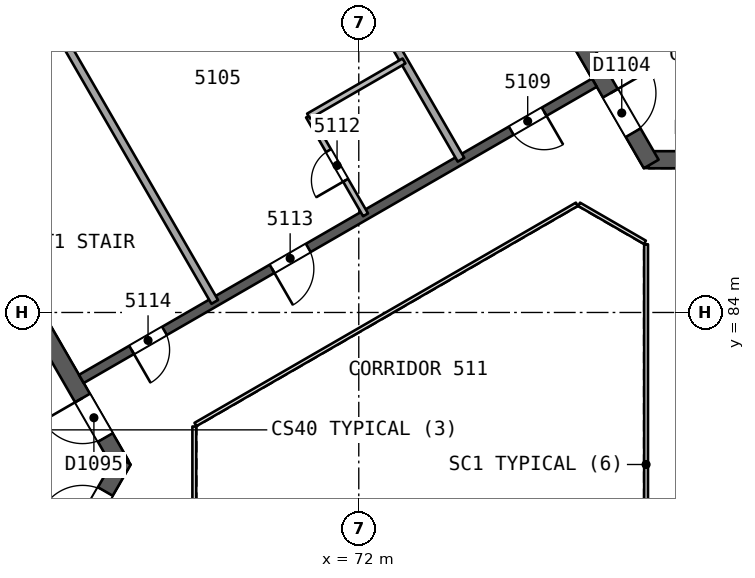
"""IFC4 building model, lengths in metres.
Left out: names, types, materials, properties, quantities, classifications, styles, units other than length and angle.
Written with IfcOpenShell. Run it as: python <this file> out.ifc"""

import sys

from ifc_helpers import new_model, si_unit, direction, frame, frame_2d, origin, place, context, subcontext, project, spatial, rectangle, extrude, element, fill, save


model = new_model("IFC4")
c1 = context("Model", 3, precision=1e-05, world=origin(), true_north=direction((0.0, 1.0)))
c2 = subcontext(c1, "Body", "Model", "MODEL_VIEW")
j1 = project(units=[si_unit("LENGTHUNIT", "METRE"), si_unit("PLANEANGLEUNIT", "RADIAN")], contexts=[c1])
p1 = place(None, origin())
s1 = spatial("IfcSite", under=j1, at=p1, CompositionType="ELEMENT")
p2 = place(p1, origin())
s2 = spatial("IfcBuilding", under=s1, at=p2, CompositionType="ELEMENT")
p3 = place(p2, frame((0.0, 0.0, 209.5)))
s3 = spatial("IfcBuildingStorey", under=s2, at=p3, CompositionType="ELEMENT", Elevation=209.5)
p4 = place(p3, frame((65.74, 80.0, 0.0), z_axis=(0.0, 0.0, 1.0), x_axis=(-0.499991857942, 0.866030104553, 0.0)))
e1 = element("IfcWall", 1, at=p4, inside=s3, PredefinedType="SHEAR", context=c2, shape_type="SweptSolid", body=[
    extrude(rectangle(XDim=10.25, YDim=0.45, at=frame_2d((5.125, 0.0))), origin(), (0.0, 0.0, 1.0), 3.7),
])
p5 = place(p4, frame((0.82, 0.0, 0.0)))
e2 = element("IfcOpeningElement", 2, at=p5, cuts=e1, PredefinedType="OPENING", context=c2, shape_type="SweptSolid", body=[
    extrude(rectangle(XDim=1.2, YDim=2.1, at=frame_2d((0.6, 1.05))), frame((0.0, 0.235, 0.0), z_axis=(0.0, -1.0, 0.0), x_axis=(1.0, 0.0, 0.0)), (0.0, 0.0, 1.0), 0.471),
])
p6 = place(p3, frame((60.728, 71.318, 0.0), z_axis=(0.0, 0.0, 1.0), x_axis=(0.500012416173, 0.866018235185, 0.0)))
e3 = element("IfcWall", 3, at=p6, inside=s3, PredefinedType="SHEAR", context=c2, shape_type="SweptSolid", body=[
    extrude(rectangle(XDim=10.155, YDim=0.45, at=frame_2d((5.078, 0.0))), origin(), (0.0, 0.0, 1.0), 3.7),
])
p7 = place(p6, frame((8.005, 0.0, 0.0)))
e4 = element("IfcOpeningElement", 4, at=p7, cuts=e3, PredefinedType="OPENING", context=c2, shape_type="SweptSolid", body=[
    extrude(rectangle(XDim=1.2, YDim=2.1, at=frame_2d((0.6, 1.05))), frame((0.0, 0.235, 0.0), z_axis=(0.0, -1.0, 0.0), x_axis=(1.0, 0.0, 0.0)), (0.0, 0.0, 1.0), 0.471),
])
p8 = place(p3, frame((79.63, 88.019, 0.0), z_axis=(0.0, 0.0, 1.0), x_axis=(1.0, 0.0, 0.0)))
e5 = element("IfcWall", 5, at=p8, inside=s3, PredefinedType="SHEAR", context=c2, shape_type="SweptSolid", body=[
    extrude(rectangle(XDim=10.25, YDim=0.45, at=frame_2d((5.125, 0.0))), origin(), (0.0, 0.0, 1.0), 3.7),
])
p9 = place(p8, frame((0.82, 0.0, 0.0)))
e6 = element("IfcOpeningElement", 6, at=p9, cuts=e5, PredefinedType="OPENING", context=c2, shape_type="SweptSolid", body=[
    extrude(rectangle(XDim=1.2, YDim=2.1, at=frame_2d((0.6, 1.05))), frame((0.0, 0.235, 0.0), z_axis=(0.0, -1.0, 0.0), x_axis=(1.0, 0.0, 0.0)), (0.0, 0.0, 1.0), 0.471),
])
p10 = place(p3, frame((74.617, 96.701, 0.0), z_axis=(0.0, 0.0, 1.0), x_axis=(0.499994385119, -0.866028645513, 0.0)))
e7 = element("IfcWall", 7, at=p10, inside=s3, PredefinedType="SHEAR", context=c2, shape_type="SweptSolid", body=[
    extrude(rectangle(XDim=10.155, YDim=0.45, at=frame_2d((5.077, 0.0))), origin(), (0.0, 0.0, 1.0), 3.7),
])
p11 = place(p10, frame((8.005, 0.0, 0.0)))
e8 = element("IfcOpeningElement", 8, at=p11, cuts=e7, PredefinedType="OPENING", context=c2, shape_type="SweptSolid", body=[
    extrude(rectangle(XDim=1.2, YDim=2.1, at=frame_2d((0.6, 1.05))), frame((0.0, 0.235, 0.0), z_axis=(0.0, -1.0, 0.0), x_axis=(1.0, 0.0, 0.0)), (0.0, 0.0, 1.0), 0.471),
])
p12 = place(p3, frame((78.2, 90.046, 0.0), z_axis=(0.0, 0.0, 1.0), x_axis=(-0.866026492143, -0.499998114903, 0.0)))
e9 = element("IfcWall", 9, at=p12, inside=s3, PredefinedType="SHEAR", context=c2, shape_type="SweptSolid", body=[
    extrude(rectangle(XDim=15.588, YDim=0.25, at=frame_2d((7.794, 0.0))), origin(), (0.0, 0.0, 1.0), 3.3),
])
p13 = place(p12, frame((1.527, 0.0, 0.0)))
e10 = element("IfcOpeningElement", 10, at=p13, cuts=e9, PredefinedType="OPENING", context=c2, shape_type="SweptSolid", body=[
    extrude(rectangle(XDim=1.0, YDim=2.1, at=frame_2d((0.5, 1.05))), frame((0.0, 0.135, 0.0), z_axis=(0.0, -1.0, 0.0), x_axis=(1.0, 0.0, 0.0)), (0.0, 0.0, 1.0), 0.271),
])
p14 = place(p12, frame((8.694, 0.0, 0.0)))
e11 = element("IfcOpeningElement", 11, at=p14, cuts=e9, PredefinedType="OPENING", context=c2, shape_type="SweptSolid", body=[
    extrude(rectangle(XDim=1.1, YDim=2.1, at=frame_2d((0.55, 1.05))), frame((0.0, 0.135, 0.0), z_axis=(0.0, -1.0, 0.0), x_axis=(1.0, 0.0, 0.0)), (0.0, 0.0, 1.0), 0.271),
])
p15 = place(p12, frame((13.062, 0.0, 0.0)))
e12 = element("IfcOpeningElement", 12, at=p15, cuts=e9, PredefinedType="OPENING", context=c2, shape_type="SweptSolid", body=[
    extrude(rectangle(XDim=1.0, YDim=2.1, at=frame_2d((0.5, 1.05))), frame((0.0, 0.135, 0.0), z_axis=(0.0, -1.0, 0.0), x_axis=(1.0, 0.0, 0.0)), (0.0, 0.0, 1.0), 0.271),
])
p16 = place(p3, frame((69.376, 97.223, 0.0), z_axis=(0.0, 0.0, 1.0), x_axis=(0.499993571489, -0.866029115255, 0.0)))
e13 = element("IfcWall", 13, at=p16, inside=s3, PredefinedType="PARTITIONING", context=c2, shape_type="SweptSolid", body=[
    extrude(rectangle(XDim=10.627, YDim=0.2, at=frame_2d((5.313, 0.0))), origin(), (0.0, 0.0, 1.0), 3.3),
])
p17 = place(p3, frame((72.178, 86.569, 0.0), z_axis=(0.0, 0.0, 1.0), x_axis=(-0.499990139034, 0.866031096941, 0.0)))
e14 = element("IfcWall", 14, at=p17, inside=s3, PredefinedType="PARTITIONING", context=c2, shape_type="SweptSolid", body=[
    extrude(rectangle(XDim=3.0, YDim=0.15, at=frame_2d((1.5, 0.0))), origin(), (0.0, 0.0, 1.0), 3.3),
])
p18 = place(p17, frame((1.05, 0.0, 0.0)))
e15 = element("IfcOpeningElement", 15, at=p18, cuts=e14, PredefinedType="OPENING", context=c2, shape_type="SweptSolid", body=[
    extrude(rectangle(XDim=0.9, YDim=2.1, at=frame_2d((0.45, 1.05))), frame((0.0, 0.085, 0.0), z_axis=(0.0, -1.0, 0.0), x_axis=(1.0, 0.0, 0.0)), (0.0, 0.0, 1.0), 0.171),
])
p19 = place(p3, frame((70.678, 89.167, 0.0), z_axis=(0.0, 0.0, 1.0), x_axis=(0.866032775405, 0.499987231761, 0.0)))
e16 = element("IfcWall", 16, at=p19, inside=s3, PredefinedType="PARTITIONING", context=c2, shape_type="SweptSolid", body=[
    extrude(rectangle(XDim=2.9, YDim=0.15, at=frame_2d((1.45, 0.0))), origin(), (0.0, 0.0, 1.0), 3.3),
])
p20 = place(p3, frame((62.896, 93.481, 0.0), z_axis=(0.0, 0.0, 1.0), x_axis=(0.499993571489, -0.866029115255, 0.0)))
e17 = element("IfcWall", 17, at=p20, inside=s3, PredefinedType="PARTITIONING", context=c2, shape_type="SweptSolid", body=[
    extrude(rectangle(XDim=10.627, YDim=0.2, at=frame_2d((5.313, 0.0))), origin(), (0.0, 0.0, 1.0), 3.3),
])
p21 = place(p3, frame((43.802, 82.63, 0.0), z_axis=(0.0, 0.0, 1.0), x_axis=(0.866026224187, 0.499998579018, 0.0)))
e18 = element("IfcWall", 18, at=p21, inside=s3, PredefinedType="SOLIDWALL", context=c2, shape_type="SweptSolid", body=[
    extrude(rectangle(XDim=51.406, YDim=0.3, at=frame_2d((25.703, 0.0))), origin(), (0.0, 0.0, 1.0), 3.3),
])
p22 = place(p21, frame((24.503, 0.0, 0.0)))
e19 = element("IfcOpeningElement", 19, at=p22, cuts=e18, PredefinedType="OPENING", context=c2, shape_type="SweptSolid", body=[
    extrude(rectangle(XDim=2.4, YDim=2.4, at=frame_2d((1.2, 1.2))), frame((0.0, 0.161, 0.0), z_axis=(0.0, -1.0, 0.0), x_axis=(1.0, 0.0, 0.0)), (0.0, 0.0, 1.0), 0.321),
])
p23 = place(p21, frame((30.271, 0.0, 0.0)))
e20 = element("IfcOpeningElement", 20, at=p23, cuts=e18, PredefinedType="OPENING", context=c2, shape_type="SweptSolid", body=[
    extrude(rectangle(XDim=2.4, YDim=2.4, at=frame_2d((1.2, 1.2))), frame((0.0, 0.161, 0.0), z_axis=(0.0, -1.0, 0.0), x_axis=(1.0, 0.0, 0.0)), (0.0, 0.0, 1.0), 0.321),
])
p24 = place(p21, frame((39.983, 0.0, 0.0)))
e21 = element("IfcOpeningElement", 21, at=p24, cuts=e18, PredefinedType="OPENING", context=c2, shape_type="SweptSolid", body=[
    extrude(rectangle(XDim=2.4, YDim=2.4, at=frame_2d((1.2, 1.2))), frame((0.0, 0.161, 0.0), z_axis=(0.0, -1.0, 0.0), x_axis=(1.0, 0.0, 0.0)), (0.0, 0.0, 1.0), 0.321),
])
p25 = place(p21, frame((18.736, 0.0, 0.0)))
e22 = element("IfcOpeningElement", 22, at=p25, cuts=e18, PredefinedType="OPENING", context=c2, shape_type="SweptSolid", body=[
    extrude(rectangle(XDim=2.4, YDim=2.4, at=frame_2d((1.2, 1.2))), frame((0.0, 0.161, 0.0), z_axis=(0.0, -1.0, 0.0), x_axis=(1.0, 0.0, 0.0)), (0.0, 0.0, 1.0), 0.321),
])
p26 = place(p21, frame((9.0, 0.0, 0.0)))
e23 = element("IfcOpeningElement", 23, at=p26, cuts=e18, PredefinedType="OPENING", context=c2, shape_type="SweptSolid", body=[
    extrude(rectangle(XDim=2.4, YDim=2.4, at=frame_2d((1.2, 1.2))), frame((0.0, 0.161, 0.0), z_axis=(0.0, -1.0, 0.0), x_axis=(1.0, 0.0, 0.0)), (0.0, 0.0, 1.0), 0.321),
])
p27 = place(p3, frame((86.77, 89.486, 0.0), z_axis=(0.0, 0.0, 1.0), x_axis=(-0.86601811187, 0.500012629753, 0.0)))
e24 = element("IfcWall", 24, at=p27, inside=s3, PredefinedType="SOLIDWALL", context=c2, shape_type="SweptSolid", body=[
    extrude(rectangle(XDim=10.9, YDim=0.2, at=frame_2d((5.45, 0.0))), origin(), (0.0, 0.0, 1.0), 3.3),
])
p28 = place(p27, frame((2.875, 0.0, 0.0)))
e25 = element("IfcOpeningElement", 25, at=p28, cuts=e24, PredefinedType="OPENING", context=c2, shape_type="SweptSolid", body=[
    extrude(rectangle(XDim=1.0, YDim=2.1, at=frame_2d((0.5, 1.05))), frame((0.0, 0.11, 0.0), z_axis=(0.0, -1.0, 0.0), x_axis=(1.0, 0.0, 0.0)), (0.0, 0.0, 1.0), 0.221),
])
p29 = place(p27, frame((7.375, 0.0, 0.0)))
e26 = element("IfcOpeningElement", 26, at=p29, cuts=e24, PredefinedType="OPENING", context=c2, shape_type="SweptSolid", body=[
    extrude(rectangle(XDim=1.0, YDim=2.1, at=frame_2d((0.5, 1.05))), frame((0.0, 0.11, 0.0), z_axis=(0.0, -1.0, 0.0), x_axis=(1.0, 0.0, 0.0)), (0.0, 0.0, 1.0), 0.221),
])
p30 = place(p3, frame((89.43, 90.814, 0.0), z_axis=(0.0, 0.0, 1.0), x_axis=(-0.866018983788, 0.500011119594, 0.0)))
e27 = element("IfcWall", 27, at=p30, inside=s3, PredefinedType="SOLIDWALL", context=c2, shape_type="SweptSolid", body=[
    extrude(rectangle(XDim=10.64, YDim=0.2, at=frame_2d((5.32, 0.0))), origin(), (0.0, 0.0, 1.0), 3.3),
])
p31 = place(p30, frame((0.37, 0.0, 0.0)))
e28 = element("IfcOpeningElement", 28, at=p31, cuts=e27, PredefinedType="OPENING", context=c2, shape_type="SweptSolid", body=[
    extrude(rectangle(XDim=0.9, YDim=2.1, at=frame_2d((0.45, 1.05))), frame((0.0, 0.11, 0.0), z_axis=(0.0, -1.0, 0.0), x_axis=(1.0, 0.0, 0.0)), (0.0, 0.0, 1.0), 0.221),
])
p32 = place(p3, frame((79.56, 74.206, 0.0), z_axis=(0.0, 0.0, 1.0), x_axis=(0.0, 1.0, 0.0)))
e29 = element("IfcWall", 29, at=p32, inside=s3, PredefinedType="PARTITIONING", context=c2, shape_type="SweptSolid", body=[
    extrude(rectangle(XDim=11.588, YDim=0.1, at=frame_2d((5.794, 0.0))), origin(), (0.0, 0.0, 1.0), 3.3),
])
p33 = place(p3, frame((79.53, 85.846, 0.0), z_axis=(0.0, 0.0, 1.0), x_axis=(-0.866041268327, 0.499972520799, 0.0)))
e30 = element("IfcWall", 30, at=p33, inside=s3, PredefinedType="PARTITIONING", context=c2, shape_type="SweptSolid", body=[
    extrude(rectangle(XDim=2.0, YDim=0.1, at=frame_2d((1.0, 0.0))), origin(), (0.0, 0.0, 1.0), 3.3),
])
p34 = place(p3, frame((77.738, 86.846, 0.0), z_axis=(0.0, 0.0, 1.0), x_axis=(-0.866026658274, -0.499997827154, 0.0)))
e31 = element("IfcWall", 31, at=p34, inside=s3, PredefinedType="PARTITIONING", context=c2, shape_type="SweptSolid", body=[
    extrude(rectangle(XDim=11.588, YDim=0.1, at=frame_2d((5.794, 0.0))), origin(), (0.0, 0.0, 1.0), 3.3),
])
p35 = place(p3, frame((67.672, 81.0, 0.0), z_axis=(0.0, 0.0, 1.0), x_axis=(0.0, -1.0, 0.0)))
e32 = element("IfcWall", 32, at=p35, inside=s3, PredefinedType="PARTITIONING", context=c2, shape_type="SweptSolid", body=[
    extrude(rectangle(XDim=2.0, YDim=0.1, at=frame_2d((1.0, 0.0))), origin(), (0.0, 0.0, 1.0), 3.3),
])
p36 = place(p13, origin())
e33 = element("IfcDoor", 33, at=p36, inside=s3, OperationType="SINGLE_SWING_LEFT", PredefinedType="NOTDEFINED", context=c2, shape_type="SweptSolid", body=[
    extrude(rectangle(XDim=1.0, YDim=2.1, at=frame_2d((0.5, 1.05))), frame((0.0, 0.025, 0.0), z_axis=(0.0, -1.0, 0.0), x_axis=(1.0, 0.0, 0.0)), (0.0, 0.0, 1.0), 0.05),
])
fill(e10, e33)
p37 = place(p18, origin())
e34 = element("IfcDoor", 34, at=p37, inside=s3, OperationType="SINGLE_SWING_LEFT", PredefinedType="NOTDEFINED", context=c2, shape_type="SweptSolid", body=[
    extrude(rectangle(XDim=0.9, YDim=2.1, at=frame_2d((0.45, 1.05))), frame((0.0, 0.025, 0.0), z_axis=(0.0, -1.0, 0.0), x_axis=(1.0, 0.0, 0.0)), (0.0, 0.0, 1.0), 0.05),
])
fill(e15, e34)
p38 = place(p14, origin())
e35 = element("IfcDoor", 35, at=p38, inside=s3, OperationType="SINGLE_SWING_RIGHT", PredefinedType="NOTDEFINED", context=c2, shape_type="SweptSolid", body=[
    extrude(rectangle(XDim=1.1, YDim=2.1, at=frame_2d((0.55, 1.05))), frame((0.0, 0.025, 0.0), z_axis=(0.0, -1.0, 0.0), x_axis=(1.0, 0.0, 0.0)), (0.0, 0.0, 1.0), 0.05),
])
fill(e11, e35)
p39 = place(p15, origin())
e36 = element("IfcDoor", 36, at=p39, inside=s3, OperationType="SINGLE_SWING_RIGHT", PredefinedType="NOTDEFINED", context=c2, shape_type="SweptSolid", body=[
    extrude(rectangle(XDim=1.0, YDim=2.1, at=frame_2d((0.5, 1.05))), frame((0.0, 0.025, 0.0), z_axis=(0.0, -1.0, 0.0), x_axis=(1.0, 0.0, 0.0)), (0.0, 0.0, 1.0), 0.05),
])
fill(e12, e36)
p40 = place(p5, origin())
e37 = element("IfcDoor", 37, at=p40, inside=s3, OperationType="SINGLE_SWING_RIGHT", PredefinedType="NOTDEFINED", context=c2, shape_type="SweptSolid", body=[
    extrude(rectangle(XDim=1.2, YDim=2.1, at=frame_2d((0.6, 1.05))), frame((0.0, 0.025, 0.0), z_axis=(0.0, -1.0, 0.0), x_axis=(1.0, 0.0, 0.0)), (0.0, 0.0, 1.0), 0.05),
])
fill(e2, e37)
p41 = place(p7, origin())
e38 = element("IfcDoor", 38, at=p41, inside=s3, OperationType="SINGLE_SWING_LEFT", PredefinedType="NOTDEFINED", context=c2, shape_type="SweptSolid", body=[
    extrude(rectangle(XDim=1.2, YDim=2.1, at=frame_2d((0.6, 1.05))), frame((0.0, 0.025, 0.0), z_axis=(0.0, -1.0, 0.0), x_axis=(1.0, 0.0, 0.0)), (0.0, 0.0, 1.0), 0.05),
])
fill(e4, e38)
p42 = place(p11, origin())
e39 = element("IfcDoor", 39, at=p42, inside=s3, OperationType="SINGLE_SWING_LEFT", PredefinedType="NOTDEFINED", context=c2, shape_type="SweptSolid", body=[
    extrude(rectangle(XDim=1.2, YDim=2.1, at=frame_2d((0.6, 1.05))), frame((0.0, 0.025, 0.0), z_axis=(0.0, -1.0, 0.0), x_axis=(1.0, 0.0, 0.0)), (0.0, 0.0, 1.0), 0.05),
])
fill(e8, e39)
save(model, sys.argv[1])
